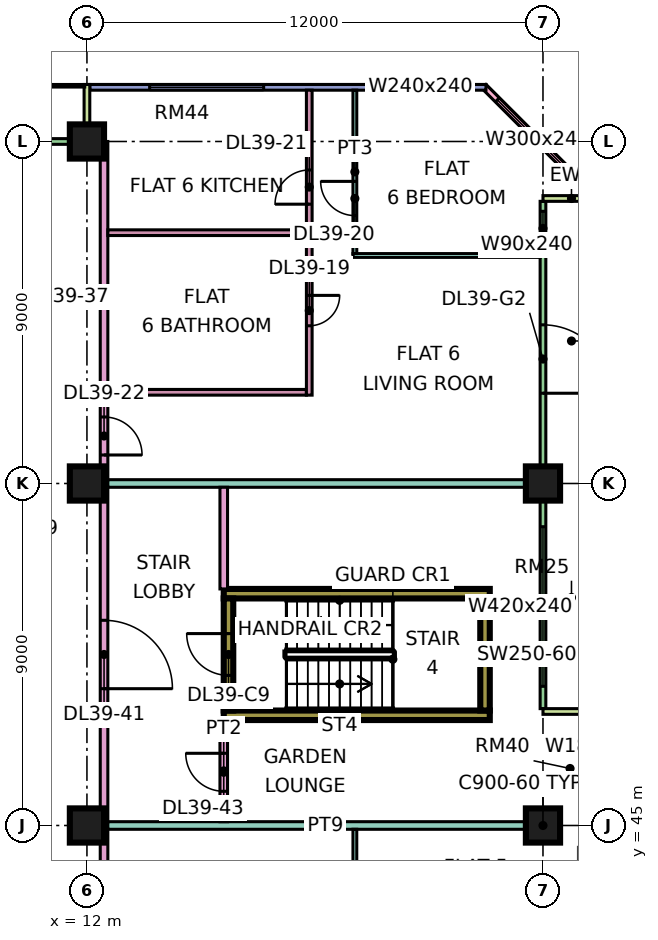
"""IFC4 building model, lengths in metres.
Left out: names, types, materials, properties, quantities, classifications, styles, units other than length and angle.
Written with IfcOpenShell. Run it as: python <this file> out.ifc"""

import sys

from ifc_helpers import new_model, si_unit, direction, frame, frame_2d, origin, origin_2d, place, context, subcontext, project, spatial, rectangle, extrude, element, fill, save


model = new_model("IFC4")
c1 = context("Model", 3, precision=1e-05, world=origin(), true_north=direction((0.0, 1.0)))
c2 = subcontext(c1, "Body", "Model", "MODEL_VIEW")
j1 = project(units=[si_unit("LENGTHUNIT", "METRE"), si_unit("PLANEANGLEUNIT", "RADIAN")], contexts=[c1])
p1 = place(None, origin())
s1 = spatial("IfcSite", under=j1, at=p1, CompositionType="ELEMENT")
p2 = place(p1, origin())
s2 = spatial("IfcBuilding", under=s1, at=p2, CompositionType="ELEMENT")
p3 = place(p2, frame((0.0, 0.0, 172.4)))
s3 = spatial("IfcBuildingStorey", under=s2, at=p3, CompositionType="ELEMENT", Elevation=172.4)
for number, where, z_axis, x_axis in (
    (1, (12.0, 45.0, 0.0), (0.0, 0.0, 1.0), (1.0, 0.0, 0.0)),
    (2, (12.0, 54.0, 0.0), (0.0, 0.0, 1.0), (1.0, 0.0, 0.0)),
    (3, (12.0, 63.0, 0.0), (0.0, 0.0, 1.0), (1.0, 0.0, 0.0)),
    (4, (24.0, 45.0, 0.0), (0.0, 0.0, 1.0), (1.0, 0.0, 0.0)),
    (5, (24.0, 54.0, 0.0), (0.0, 0.0, 1.0), (1.0, 0.0, 0.0)),
):
    element("IfcColumn", number, at=place(p3, frame(where, z_axis=z_axis, x_axis=x_axis)), inside=s3, PredefinedType="COLUMN", context=c2, shape_type="SweptSolid", body=[
        extrude(rectangle(XDim=0.9, YDim=0.9, at=origin_2d()), origin(), (0.0, 0.0, 1.0), 3.75),
    ])
for number, where, z_axis, x_axis in (
    (6, (15.6, 47.9, 0.0), (0.0, 0.0, 1.0), (1.0, 0.0, 0.0)),
    (7, (15.6, 51.1, 0.0), (0.0, 0.0, 1.0), (1.0, 0.0, 0.0)),
):
    element("IfcWall", number, at=place(p3, frame(where, z_axis=z_axis, x_axis=x_axis)), inside=s3, PredefinedType="SHEAR", context=c2, shape_type="SweptSolid", body=[
        extrude(rectangle(XDim=7.0, YDim=0.25, at=frame_2d((3.5, 0.0))), origin(), (0.0, 0.0, 1.0), 3.75),
    ])
p4 = place(p3, frame((15.725, 48.025, 0.0), z_axis=(0.0, 0.0, 1.0), x_axis=(0.0, 1.0, 0.0)))
e8 = element("IfcWall", 8, at=p4, inside=s3, PredefinedType="SHEAR", context=c2, shape_type="SweptSolid", body=[
    extrude(rectangle(XDim=2.95, YDim=0.25, at=frame_2d((1.475, 0.0))), origin(), (0.0, 0.0, 1.0), 3.75),
])
p5 = place(p4, frame((0.925, 0.0, 0.0)))
e9 = element("IfcOpeningElement", 9, at=p5, cuts=e8, PredefinedType="OPENING", context=c2, shape_type="SweptSolid", body=[
    extrude(rectangle(XDim=1.1, YDim=2.2, at=frame_2d((0.55, 1.1))), frame((0.0, 0.135, 0.0), z_axis=(0.0, -1.0, 0.0), x_axis=(1.0, 0.0, 0.0)), (0.0, 0.0, 1.0), 0.27),
])
p6 = place(p3, frame((22.475, 48.025, 0.0), z_axis=(0.0, 0.0, 1.0), x_axis=(0.0, 1.0, 0.0)))
e10 = element("IfcWall", 10, at=p6, inside=s3, PredefinedType="SHEAR", context=c2, shape_type="SweptSolid", body=[
    extrude(rectangle(XDim=2.95, YDim=0.25, at=frame_2d((1.475, 0.0))), origin(), (0.0, 0.0, 1.0), 3.75),
])
p7 = place(p3, frame((24.0, 48.075, 0.0), z_axis=(0.0, 0.0, 1.0), x_axis=(0.0, 1.0, 0.0)))
e11 = element("IfcWall", 11, at=p7, inside=s3, PredefinedType="SOLIDWALL", context=c2, shape_type="SweptSolid", body=[
    extrude(rectangle(XDim=13.35, YDim=0.15, at=frame_2d((6.675, 0.0))), origin(), (0.0, 0.0, 1.0), 3.35),
])
p8 = place(p7, frame((0.587, 0.0, 0.45)))
e12 = element("IfcOpeningElement", 12, at=p8, cuts=e11, PredefinedType="OPENING", context=c2, shape_type="SweptSolid", body=[
    extrude(rectangle(XDim=4.2, YDim=2.4, at=frame_2d((2.1, 1.2))), frame((0.0, 0.085, 0.0), z_axis=(0.0, -1.0, 0.0), x_axis=(1.0, 0.0, 0.0)), (0.0, 0.0, 1.0), 0.17),
])
p9 = place(p7, frame((8.3, 0.0, 0.0)))
e13 = element("IfcOpeningElement", 13, at=p9, cuts=e11, PredefinedType="OPENING", context=c2, shape_type="SweptSolid", body=[
    extrude(rectangle(XDim=1.8, YDim=2.4, at=frame_2d((0.9, 1.2))), frame((0.0, 0.085, 0.0), z_axis=(0.0, -1.0, 0.0), x_axis=(1.0, 0.0, 0.0)), (0.0, 0.0, 1.0), 0.17),
])
p10 = place(p7, frame((12.188, 0.0, 0.45)))
e14 = element("IfcOpeningElement", 14, at=p10, cuts=e11, PredefinedType="OPENING", context=c2, shape_type="SweptSolid", body=[
    extrude(rectangle(XDim=0.9, YDim=2.4, at=frame_2d((0.45, 1.2))), frame((0.0, 0.085, 0.0), z_axis=(0.0, -1.0, 0.0), x_axis=(1.0, 0.0, 0.0)), (0.0, 0.0, 1.0), 0.17),
])
for number, where, z_axis, x_axis in (
    (15, (25.5, 48.0, 0.0), (0.0, 0.0, 1.0), (-1.0, 0.0, 0.0)),
    (16, (25.5, 61.5, 0.0), (0.0, 0.0, 1.0), (-1.0, 0.0, 0.0)),
):
    element("IfcWall", number, at=place(p3, frame(where, z_axis=z_axis, x_axis=x_axis)), inside=s3, PredefinedType="SOLIDWALL", context=c2, shape_type="SweptSolid", body=[
        extrude(rectangle(XDim=1.5, YDim=0.15, at=frame_2d((0.75, 0.0))), origin(), (0.0, 0.0, 1.0), 3.35),
    ])
p11 = place(p3, frame((25.447, 61.447, 0.0), z_axis=(0.0, 0.0, 1.0), x_axis=(-0.707106781187, 0.707106781187, 0.0)))
e17 = element("IfcWall", 17, at=p11, inside=s3, PredefinedType="SOLIDWALL", context=c2, shape_type="SweptSolid", body=[
    extrude(rectangle(XDim=4.243, YDim=0.15, at=frame_2d((2.121, 0.0))), origin(), (0.0, 0.0, 1.0), 3.35),
])
p12 = place(p11, frame((0.744, 0.0, 0.45)))
e18 = element("IfcOpeningElement", 18, at=p12, cuts=e17, PredefinedType="OPENING", context=c2, shape_type="SweptSolid", body=[
    extrude(rectangle(XDim=3.0, YDim=2.4, at=frame_2d((1.5, 1.2))), frame((0.0, 0.085, 0.0), z_axis=(0.0, -1.0, 0.0), x_axis=(1.0, 0.0, 0.0)), (0.0, 0.0, 1.0), 0.17),
])
p13 = place(p3, frame((22.5, 64.425, 0.0), z_axis=(0.0, 0.0, 1.0), x_axis=(-1.0, 0.0, 0.0)))
e19 = element("IfcWall", 19, at=p13, inside=s3, PredefinedType="SOLIDWALL", context=c2, shape_type="SweptSolid", body=[
    extrude(rectangle(XDim=10.425, YDim=0.15, at=frame_2d((5.212, 0.0))), origin(), (0.0, 0.0, 1.0), 3.35),
])
p14 = place(p13, frame((0.525, 0.0, 0.45)))
e20 = element("IfcOpeningElement", 20, at=p14, cuts=e19, PredefinedType="OPENING", context=c2, shape_type="SweptSolid", body=[
    extrude(rectangle(XDim=2.4, YDim=2.4, at=frame_2d((1.2, 1.2))), frame((0.0, 0.085, 0.0), z_axis=(0.0, -1.0, 0.0), x_axis=(1.0, 0.0, 0.0)), (0.0, 0.0, 1.0), 0.17),
])
p15 = place(p13, frame((5.85, 0.0, 0.45)))
e21 = element("IfcOpeningElement", 21, at=p15, cuts=e19, PredefinedType="OPENING", context=c2, shape_type="SweptSolid", body=[
    extrude(rectangle(XDim=3.0, YDim=2.4, at=frame_2d((1.5, 1.2))), frame((0.0, 0.085, 0.0), z_axis=(0.0, -1.0, 0.0), x_axis=(1.0, 0.0, 0.0)), (0.0, 0.0, 1.0), 0.17),
])
p16 = place(p3, frame((11.925, 63.0, 0.0), z_axis=(0.0, 0.0, 1.0), x_axis=(-1.0, 0.0, 0.0)))
e22 = element("IfcWall", 22, at=p16, inside=s3, PredefinedType="SOLIDWALL", context=c2, shape_type="SweptSolid", body=[
    extrude(rectangle(XDim=10.35, YDim=0.15, at=frame_2d((5.175, 0.0))), origin(), (0.0, 0.0, 1.0), 3.35),
])
p17 = place(p16, frame((7.688, 0.0, 0.0)))
e23 = element("IfcOpeningElement", 23, at=p17, cuts=e22, PredefinedType="OPENING", context=c2, shape_type="SweptSolid", body=[
    extrude(rectangle(XDim=1.8, YDim=2.4, at=frame_2d((0.9, 1.2))), frame((0.0, 0.085, 0.0), z_axis=(0.0, -1.0, 0.0), x_axis=(1.0, 0.0, 0.0)), (0.0, 0.0, 1.0), 0.17),
])
p18 = place(p3, frame((12.0, 64.5, 0.0), z_axis=(0.0, 0.0, 1.0), x_axis=(0.0, -1.0, 0.0)))
e24 = element("IfcWall", 24, at=p18, inside=s3, PredefinedType="SOLIDWALL", context=c2, shape_type="SweptSolid", body=[
    extrude(rectangle(XDim=1.5, YDim=0.15, at=frame_2d((0.75, 0.0))), origin(), (0.0, 0.0, 1.0), 3.35),
])
p19 = place(p3, frame((12.45, 20.0, 0.0), z_axis=(0.0, 0.0, 1.0), x_axis=(0.0, 1.0, 0.0)))
e25 = element("IfcWall", 25, at=p19, inside=s3, PredefinedType="PARTITIONING", context=c2, shape_type="SweptSolid", body=[
    extrude(rectangle(XDim=43.0, YDim=0.2, at=frame_2d((21.5, 0.0))), origin(), (0.0, 0.0, 1.0), 3.35),
])
p20 = place(p19, frame((5.95, 0.0, 0.0)))
e26 = element("IfcOpeningElement", 26, at=p20, cuts=e25, PredefinedType="OPENING", context=c2, shape_type="SweptSolid", body=[
    extrude(rectangle(XDim=1.0, YDim=2.1, at=frame_2d((0.5, 1.05))), frame((0.0, 0.11, 0.0), z_axis=(0.0, -1.0, 0.0), x_axis=(1.0, 0.0, 0.0)), (0.0, 0.0, 1.0), 0.22),
])
p21 = place(p19, frame((12.0, 0.0, 0.0)))
e27 = element("IfcOpeningElement", 27, at=p21, cuts=e25, PredefinedType="OPENING", context=c2, shape_type="SweptSolid", body=[
    extrude(rectangle(XDim=1.0, YDim=2.1, at=frame_2d((0.5, 1.05))), frame((0.0, 0.11, 0.0), z_axis=(0.0, -1.0, 0.0), x_axis=(1.0, 0.0, 0.0)), (0.0, 0.0, 1.0), 0.22),
])
p22 = place(p19, frame((22.75, 0.0, 0.0)))
e28 = element("IfcOpeningElement", 28, at=p22, cuts=e25, PredefinedType="OPENING", context=c2, shape_type="SweptSolid", body=[
    extrude(rectangle(XDim=1.0, YDim=2.1, at=frame_2d((0.5, 1.05))), frame((0.0, 0.11, 0.0), z_axis=(0.0, -1.0, 0.0), x_axis=(1.0, 0.0, 0.0)), (0.0, 0.0, 1.0), 0.22),
])
p23 = place(p19, frame((34.75, 0.0, 0.0)))
e29 = element("IfcOpeningElement", 29, at=p23, cuts=e25, PredefinedType="OPENING", context=c2, shape_type="SweptSolid", body=[
    extrude(rectangle(XDim=1.0, YDim=2.1, at=frame_2d((0.5, 1.05))), frame((0.0, 0.11, 0.0), z_axis=(0.0, -1.0, 0.0), x_axis=(1.0, 0.0, 0.0)), (0.0, 0.0, 1.0), 0.22),
])
p24 = place(p19, frame((1.15, 0.0, 0.0)))
e30 = element("IfcOpeningElement", 30, at=p24, cuts=e25, PredefinedType="OPENING", context=c2, shape_type="SweptSolid", body=[
    extrude(rectangle(XDim=1.8, YDim=2.1, at=frame_2d((0.9, 1.05))), frame((0.0, 0.11, 0.0), z_axis=(0.0, -1.0, 0.0), x_axis=(1.0, 0.0, 0.0)), (0.0, 0.0, 1.0), 0.22),
])
p25 = place(p19, frame((28.6, 0.0, 0.0)))
e31 = element("IfcOpeningElement", 31, at=p25, cuts=e25, PredefinedType="OPENING", context=c2, shape_type="SweptSolid", body=[
    extrude(rectangle(XDim=1.8, YDim=2.1, at=frame_2d((0.9, 1.05))), frame((0.0, 0.11, 0.0), z_axis=(0.0, -1.0, 0.0), x_axis=(1.0, 0.0, 0.0)), (0.0, 0.0, 1.0), 0.22),
])
p26 = place(p3, frame((12.55, 45.0, 0.0), z_axis=(0.0, 0.0, 1.0), x_axis=(1.0, 0.0, 0.0)))
e32 = element("IfcWall", 32, at=p26, inside=s3, PredefinedType="PARTITIONING", context=c2, shape_type="SweptSolid", body=[
    extrude(rectangle(XDim=11.45, YDim=0.2, at=frame_2d((5.725, 0.0))), origin(), (0.0, 0.0, 1.0), 3.35),
])
p27 = place(p3, frame((12.55, 54.0, 0.0), z_axis=(0.0, 0.0, 1.0), x_axis=(1.0, 0.0, 0.0)))
e33 = element("IfcWall", 33, at=p27, inside=s3, PredefinedType="PARTITIONING", context=c2, shape_type="SweptSolid", body=[
    extrude(rectangle(XDim=11.376, YDim=0.2, at=frame_2d((5.688, 0.0))), origin(), (0.0, 0.0, 1.0), 3.35),
])
for number, where, z_axis, x_axis in (
    (34, (12.55, 56.4, 0.0), (0.0, 0.0, 1.0), (1.0, 0.0, 0.0)),
    (35, (12.55, 60.6, 0.0), (0.0, 0.0, 1.0), (1.0, 0.0, 0.0)),
):
    element("IfcWall", number, at=place(p3, frame(where, z_axis=z_axis, x_axis=x_axis)), inside=s3, PredefinedType="PARTITIONING", context=c2, shape_type="SweptSolid", body=[
        extrude(rectangle(XDim=5.225, YDim=0.15, at=frame_2d((2.612, 0.0))), origin(), (0.0, 0.0, 1.0), 3.35),
    ])
p28 = place(p3, frame((15.6, 45.1, 0.0), z_axis=(0.0, 0.0, 1.0), x_axis=(0.0, 1.0, 0.0)))
e36 = element("IfcWall", 36, at=p28, inside=s3, PredefinedType="PARTITIONING", context=c2, shape_type="SweptSolid", body=[
    extrude(rectangle(XDim=2.675, YDim=0.2, at=frame_2d((1.337, 0.0))), origin(), (0.0, 0.0, 1.0), 3.35),
])
p29 = place(p28, frame((0.8, 0.0, 0.0)))
e37 = element("IfcOpeningElement", 37, at=p29, cuts=e36, PredefinedType="OPENING", context=c2, shape_type="SweptSolid", body=[
    extrude(rectangle(XDim=1.0, YDim=2.1, at=frame_2d((0.5, 1.05))), frame((0.0, 0.11, 0.0), z_axis=(0.0, -1.0, 0.0), x_axis=(1.0, 0.0, 0.0)), (0.0, 0.0, 1.0), 0.22),
])
p30 = place(p3, frame((15.6, 51.225, 0.0), z_axis=(0.0, 0.0, 1.0), x_axis=(0.0, 1.0, 0.0)))
e38 = element("IfcWall", 38, at=p30, inside=s3, PredefinedType="PARTITIONING", context=c2, shape_type="SweptSolid", body=[
    extrude(rectangle(XDim=2.675, YDim=0.2, at=frame_2d((1.337, 0.0))), origin(), (0.0, 0.0, 1.0), 3.35),
])
p31 = place(p3, frame((17.85, 56.325, 0.0), z_axis=(0.0, 0.0, 1.0), x_axis=(0.0, 1.0, 0.0)))
e39 = element("IfcWall", 39, at=p31, inside=s3, PredefinedType="PARTITIONING", context=c2, shape_type="SweptSolid", body=[
    extrude(rectangle(XDim=8.025, YDim=0.15, at=frame_2d((4.013, 0.0))), origin(), (0.0, 0.0, 1.0), 3.35),
])
p32 = place(p31, frame((1.825, 0.0, 0.0)))
e40 = element("IfcOpeningElement", 40, at=p32, cuts=e39, PredefinedType="OPENING", context=c2, shape_type="SweptSolid", body=[
    extrude(rectangle(XDim=0.8, YDim=2.1, at=frame_2d((0.4, 1.05))), frame((0.0, 0.085, 0.0), z_axis=(0.0, -1.0, 0.0), x_axis=(1.0, 0.0, 0.0)), (0.0, 0.0, 1.0), 0.17),
])
p33 = place(p31, frame((5.025, 0.0, 0.0)))
e41 = element("IfcOpeningElement", 41, at=p33, cuts=e39, PredefinedType="OPENING", context=c2, shape_type="SweptSolid", body=[
    extrude(rectangle(XDim=0.9, YDim=2.1, at=frame_2d((0.45, 1.05))), frame((0.0, 0.085, 0.0), z_axis=(0.0, -1.0, 0.0), x_axis=(1.0, 0.0, 0.0)), (0.0, 0.0, 1.0), 0.17),
])
p34 = place(p3, frame((19.0, 60.0, 0.0), z_axis=(0.0, 0.0, 1.0), x_axis=(1.0, 0.0, 0.0)))
e42 = element("IfcWall", 42, at=p34, inside=s3, PredefinedType="PARTITIONING", context=c2, shape_type="SweptSolid", body=[
    extrude(rectangle(XDim=4.926, YDim=0.1, at=frame_2d((2.463, 0.0))), origin(), (0.0, 0.0, 1.0), 3.35),
])
p35 = place(p3, frame((19.05, 42.05, 0.0), z_axis=(0.0, 0.0, 1.0), x_axis=(0.0, 1.0, 0.0)))
e43 = element("IfcWall", 43, at=p35, inside=s3, PredefinedType="PARTITIONING", context=c2, shape_type="SweptSolid", body=[
    extrude(rectangle(XDim=2.85, YDim=0.1, at=frame_2d((1.425, 0.0))), origin(), (0.0, 0.0, 1.0), 3.35),
])
p36 = place(p35, frame((1.0, 0.0, 0.0)))
e44 = element("IfcOpeningElement", 44, at=p36, cuts=e43, PredefinedType="OPENING", context=c2, shape_type="SweptSolid", body=[
    extrude(rectangle(XDim=0.9, YDim=2.1, at=frame_2d((0.45, 1.05))), frame((0.0, 0.06, 0.0), z_axis=(0.0, -1.0, 0.0), x_axis=(1.0, 0.0, 0.0)), (0.0, 0.0, 1.0), 0.12),
])
p37 = place(p3, frame((19.05, 60.05, 0.0), z_axis=(0.0, 0.0, 1.0), x_axis=(0.0, 1.0, 0.0)))
e45 = element("IfcWall", 45, at=p37, inside=s3, PredefinedType="PARTITIONING", context=c2, shape_type="SweptSolid", body=[
    extrude(rectangle(XDim=4.301, YDim=0.1, at=frame_2d((2.15, 0.0))), origin(), (0.0, 0.0, 1.0), 3.35),
])
p38 = place(p37, frame((1.0, 0.0, 0.0)))
e46 = element("IfcOpeningElement", 46, at=p38, cuts=e45, PredefinedType="OPENING", context=c2, shape_type="SweptSolid", body=[
    extrude(rectangle(XDim=0.9, YDim=2.1, at=frame_2d((0.45, 1.05))), frame((0.0, 0.06, 0.0), z_axis=(0.0, -1.0, 0.0), x_axis=(1.0, 0.0, 0.0)), (0.0, 0.0, 1.0), 0.12),
])
p39 = place(p8, origin())
e47 = element("IfcWindow", 47, at=p39, inside=s3, PartitioningType="SINGLE_PANEL", PredefinedType="WINDOW", context=c2, shape_type="SweptSolid", body=[
    extrude(rectangle(XDim=4.2, YDim=2.4, at=frame_2d((2.1, 1.2))), frame((0.0, 0.03, 0.0), z_axis=(0.0, -1.0, 0.0), x_axis=(1.0, 0.0, 0.0)), (0.0, 0.0, 1.0), 0.06),
])
fill(e12, e47)
p40 = place(p9, frame((1.8, 0.0, 0.0), z_axis=(0.0, 0.0, 1.0), x_axis=(-1.0, 0.0, 0.0)))
e48 = element("IfcDoor", 48, at=p40, inside=s3, OperationType="DOUBLE_DOOR_SINGLE_SWING", PredefinedType="DOOR", context=c2, shape_type="SweptSolid", body=[
    extrude(rectangle(XDim=1.8, YDim=2.4, at=frame_2d((0.9, 1.2))), frame((0.0, 0.025, 0.0), z_axis=(0.0, -1.0, 0.0), x_axis=(1.0, 0.0, 0.0)), (0.0, 0.0, 1.0), 0.05),
])
fill(e13, e48)
p41 = place(p10, origin())
e49 = element("IfcWindow", 49, at=p41, inside=s3, PartitioningType="SINGLE_PANEL", PredefinedType="WINDOW", context=c2, shape_type="SweptSolid", body=[
    extrude(rectangle(XDim=0.9, YDim=2.4, at=frame_2d((0.45, 1.2))), frame((0.0, 0.03, 0.0), z_axis=(0.0, -1.0, 0.0), x_axis=(1.0, 0.0, 0.0)), (0.0, 0.0, 1.0), 0.06),
])
fill(e14, e49)
p42 = place(p12, origin())
e50 = element("IfcWindow", 50, at=p42, inside=s3, PartitioningType="SINGLE_PANEL", PredefinedType="WINDOW", context=c2, shape_type="SweptSolid", body=[
    extrude(rectangle(XDim=3.0, YDim=2.4, at=frame_2d((1.5, 1.2))), frame((0.0, 0.03, 0.0), z_axis=(0.0, -1.0, 0.0), x_axis=(1.0, 0.0, 0.0)), (0.0, 0.0, 1.0), 0.06),
])
fill(e18, e50)
p43 = place(p14, origin())
e51 = element("IfcWindow", 51, at=p43, inside=s3, PartitioningType="SINGLE_PANEL", PredefinedType="WINDOW", context=c2, shape_type="SweptSolid", body=[
    extrude(rectangle(XDim=2.4, YDim=2.4, at=frame_2d((1.2, 1.2))), frame((0.0, 0.03, 0.0), z_axis=(0.0, -1.0, 0.0), x_axis=(1.0, 0.0, 0.0)), (0.0, 0.0, 1.0), 0.06),
])
fill(e20, e51)
p44 = place(p15, origin())
e52 = element("IfcWindow", 52, at=p44, inside=s3, PartitioningType="SINGLE_PANEL", PredefinedType="WINDOW", context=c2, shape_type="SweptSolid", body=[
    extrude(rectangle(XDim=3.0, YDim=2.4, at=frame_2d((1.5, 1.2))), frame((0.0, 0.03, 0.0), z_axis=(0.0, -1.0, 0.0), x_axis=(1.0, 0.0, 0.0)), (0.0, 0.0, 1.0), 0.06),
])
fill(e21, e52)
p45 = place(p5, frame((1.1, 0.0, 0.0), z_axis=(0.0, 0.0, 1.0), x_axis=(-1.0, 0.0, 0.0)))
e53 = element("IfcDoor", 53, at=p45, inside=s3, OperationType="SINGLE_SWING_RIGHT", PredefinedType="DOOR", context=c2, shape_type="SweptSolid", body=[
    extrude(rectangle(XDim=1.1, YDim=2.2, at=frame_2d((0.55, 1.1))), frame((0.0, 0.025, 0.0), z_axis=(0.0, -1.0, 0.0), x_axis=(1.0, 0.0, 0.0)), (0.0, 0.0, 1.0), 0.05),
])
fill(e9, e53)
p46 = place(p32, origin())
e54 = element("IfcDoor", 54, at=p46, inside=s3, OperationType="SINGLE_SWING_RIGHT", PredefinedType="DOOR", context=c2, shape_type="SweptSolid", body=[
    extrude(rectangle(XDim=0.8, YDim=2.1, at=frame_2d((0.4, 1.05))), frame((0.0, 0.025, 0.0), z_axis=(0.0, -1.0, 0.0), x_axis=(1.0, 0.0, 0.0)), (0.0, 0.0, 1.0), 0.05),
])
fill(e40, e54)
p47 = place(p38, frame((0.9, 0.0, 0.0), z_axis=(0.0, 0.0, 1.0), x_axis=(-1.0, 0.0, 0.0)))
e55 = element("IfcDoor", 55, at=p47, inside=s3, OperationType="SINGLE_SWING_RIGHT", PredefinedType="DOOR", context=c2, shape_type="SweptSolid", body=[
    extrude(rectangle(XDim=0.9, YDim=2.1, at=frame_2d((0.45, 1.05))), frame((0.0, 0.025, 0.0), z_axis=(0.0, -1.0, 0.0), x_axis=(1.0, 0.0, 0.0)), (0.0, 0.0, 1.0), 0.05),
])
fill(e46, e55)
p48 = place(p33, origin())
e56 = element("IfcDoor", 56, at=p48, inside=s3, OperationType="SINGLE_SWING_LEFT", PredefinedType="DOOR", context=c2, shape_type="SweptSolid", body=[
    extrude(rectangle(XDim=0.9, YDim=2.1, at=frame_2d((0.45, 1.05))), frame((0.0, 0.025, 0.0), z_axis=(0.0, -1.0, 0.0), x_axis=(1.0, 0.0, 0.0)), (0.0, 0.0, 1.0), 0.05),
])
fill(e41, e56)
p49 = place(p23, frame((1.0, 0.0, 0.0), z_axis=(0.0, 0.0, 1.0), x_axis=(-1.0, 0.0, 0.0)))
e57 = element("IfcDoor", 57, at=p49, inside=s3, OperationType="SINGLE_SWING_LEFT", PredefinedType="DOOR", context=c2, shape_type="SweptSolid", body=[
    extrude(rectangle(XDim=1.0, YDim=2.1, at=frame_2d((0.5, 1.05))), frame((0.0, 0.025, 0.0), z_axis=(0.0, -1.0, 0.0), x_axis=(1.0, 0.0, 0.0)), (0.0, 0.0, 1.0), 0.05),
])
fill(e29, e57)
p50 = place(p25, frame((1.8, 0.0, 0.0), z_axis=(0.0, 0.0, 1.0), x_axis=(-1.0, 0.0, 0.0)))
e58 = element("IfcDoor", 58, at=p50, inside=s3, OperationType="DOUBLE_DOOR_SINGLE_SWING", PredefinedType="DOOR", context=c2, shape_type="SweptSolid", body=[
    extrude(rectangle(XDim=1.8, YDim=2.1, at=frame_2d((0.9, 1.05))), frame((0.0, 0.025, 0.0), z_axis=(0.0, -1.0, 0.0), x_axis=(1.0, 0.0, 0.0)), (0.0, 0.0, 1.0), 0.05),
])
fill(e31, e58)
p51 = place(p29, frame((1.0, 0.0, 0.0), z_axis=(0.0, 0.0, 1.0), x_axis=(-1.0, 0.0, 0.0)))
e59 = element("IfcDoor", 59, at=p51, inside=s3, OperationType="SINGLE_SWING_RIGHT", PredefinedType="DOOR", context=c2, shape_type="SweptSolid", body=[
    extrude(rectangle(XDim=1.0, YDim=2.1, at=frame_2d((0.5, 1.05))), frame((0.0, 0.025, 0.0), z_axis=(0.0, -1.0, 0.0), x_axis=(1.0, 0.0, 0.0)), (0.0, 0.0, 1.0), 0.05),
])
fill(e37, e59)
save(model, sys.argv[1])
